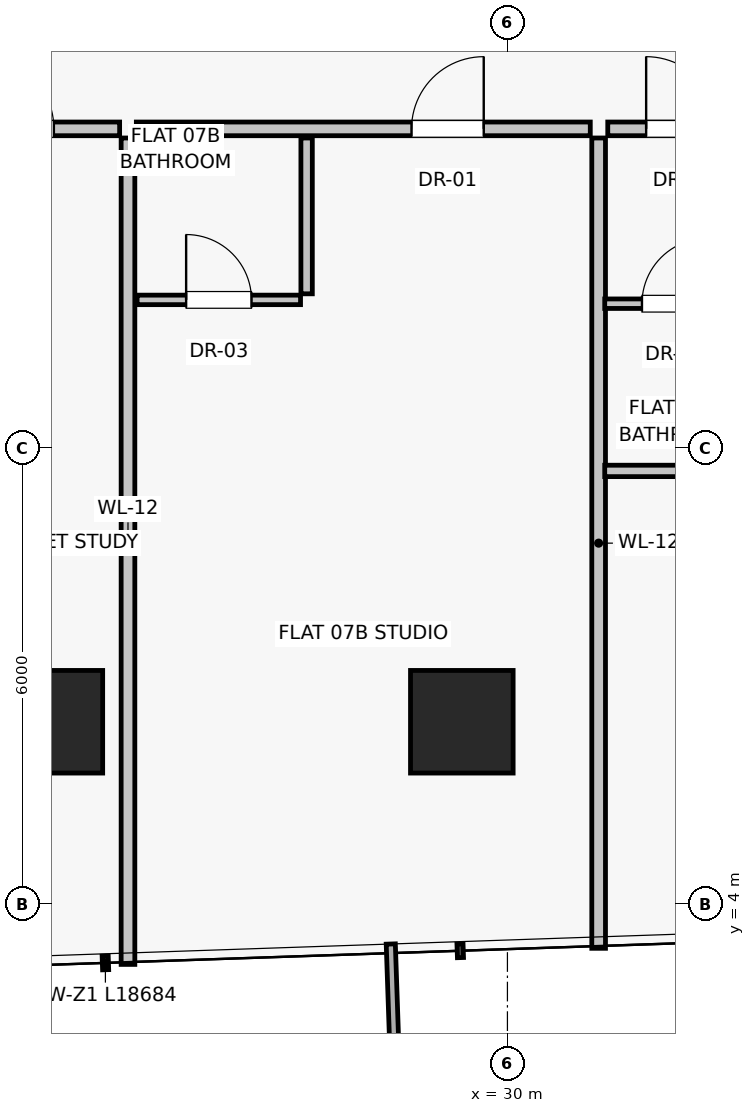
"""IFC4 building model, lengths in metres.
Left out: names, types, materials, properties, quantities, classifications, styles, units other than length and angle.
Written with IfcOpenShell. Run it as: python <this file> out.ifc"""

import sys

from ifc_helpers import new_model, si_unit, direction, frame, frame_2d, origin, origin_2d, place, context, subcontext, project, spatial, rectangle, extrude, source, transform, mapped, element, fill, save


model = new_model("IFC4")
c1 = context("Model", 3, precision=1e-05, world=origin(), true_north=direction((0.0, 1.0)))
c2 = subcontext(c1, "Body", "Model", "MODEL_VIEW")
j1 = project(units=[si_unit("LENGTHUNIT", "METRE"), si_unit("PLANEANGLEUNIT", "RADIAN")], contexts=[c1])
p1 = place(None, origin())
s1 = spatial("IfcSite", under=j1, at=p1, CompositionType="ELEMENT")
p2 = place(p1, origin())
s2 = spatial("IfcBuilding", under=s1, at=p2, CompositionType="ELEMENT")
p3 = place(p2, frame((0.0, 0.0, 30.55)))
s3 = spatial("IfcBuildingStorey", under=s2, at=p3, CompositionType="ELEMENT", Elevation=30.55)
for number, where, z_axis, x_axis in (
    (1, (24.0, 6.4, 0.0), (0.0, 0.0, 1.0), (1.0, 0.0, 0.0)),
    (2, (29.4, 6.4, 0.0), (0.0, 0.0, 1.0), (1.0, 0.0, 0.0)),
):
    element("IfcColumn", number, at=place(p3, frame(where, z_axis=z_axis, x_axis=x_axis)), inside=s3, PredefinedType="COLUMN", context=c2, shape_type="SweptSolid", body=[
        extrude(rectangle(XDim=1.35, YDim=1.35, at=origin_2d()), origin(), (0.0, 0.0, 1.0), 3.25),
    ])
p4 = place(p3, frame((31.2, 14.08, 0.0), z_axis=(0.0, 0.0, 1.0), x_axis=(0.0, -1.0, 0.0)))
e3 = element("IfcWall", 3, at=p4, inside=s3, PredefinedType="PARTITIONING", context=c2, shape_type="SweptSolid", body=[
    extrude(rectangle(XDim=10.66, YDim=0.18, at=frame_2d((5.33, 0.0))), origin(), (0.0, 0.0, 1.0), 3.0),
])
p5 = place(p3, frame((22.168, 14.2, 0.0), z_axis=(0.0, 0.0, 1.0), x_axis=(1.0, 0.0, 0.0)))
e4 = element("IfcWall", 4, at=p5, inside=s3, PredefinedType="PARTITIONING", context=c2, shape_type="SweptSolid", body=[
    extrude(rectangle(XDim=2.73, YDim=0.18, at=frame_2d((1.365, 0.0))), origin(), (0.0, 0.0, 1.0), 3.0),
])
p6 = place(p5, frame((0.865, 0.0, 0.0)))
e5 = element("IfcOpeningElement", 5, at=p6, cuts=e4, PredefinedType="OPENING", context=c2, shape_type="SweptSolid", body=[
    extrude(rectangle(XDim=1.0, YDim=2.01, at=frame_2d((0.5, 1.005))), frame((0.0, 0.1, 0.0), z_axis=(0.0, -1.0, 0.0), x_axis=(1.0, 0.0, 0.0)), (0.0, 0.0, 1.0), 0.2),
])
p7 = place(p3, frame((25.008, 14.08, 0.0), z_axis=(0.0, 0.0, 1.0), x_axis=(0.0, -1.0, 0.0)))
e6 = element("IfcWall", 6, at=p7, inside=s3, PredefinedType="PARTITIONING", context=c2, shape_type="SweptSolid", body=[
    extrude(rectangle(XDim=10.872, YDim=0.18, at=frame_2d((5.436, 0.0))), origin(), (0.0, 0.0, 1.0), 3.0),
])
p8 = place(p3, frame((25.118, 14.2, 0.0), z_axis=(0.0, 0.0, 1.0), x_axis=(1.0, 0.0, 0.0)))
e7 = element("IfcWall", 7, at=p8, inside=s3, PredefinedType="PARTITIONING", context=c2, shape_type="SweptSolid", body=[
    extrude(rectangle(XDim=5.972, YDim=0.18, at=frame_2d((2.986, 0.0))), origin(), (0.0, 0.0, 1.0), 3.0),
])
p9 = place(p8, frame((3.62, 0.0, 0.0)))
e8 = element("IfcOpeningElement", 8, at=p9, cuts=e7, PredefinedType="OPENING", context=c2, shape_type="SweptSolid", body=[
    extrude(rectangle(XDim=0.95, YDim=2.02, at=frame_2d((0.475, 1.01))), frame((0.0, 0.1, 0.0), z_axis=(0.0, -1.0, 0.0), x_axis=(1.0, 0.0, 0.0)), (0.0, 0.0, 1.0), 0.2),
])
p10 = place(p3, frame((27.358, 14.08, 0.0), z_axis=(0.0, 0.0, 1.0), x_axis=(0.0, -1.0, 0.0)))
e9 = element("IfcWall", 9, at=p10, inside=s3, PredefinedType="PARTITIONING", context=c2, shape_type="SweptSolid", body=[
    extrude(rectangle(XDim=2.05, YDim=0.15, at=frame_2d((1.025, 0.0))), origin(), (0.0, 0.0, 1.0), 3.0),
])
p11 = place(p3, frame((25.128, 11.95, 0.0), z_axis=(0.0, 0.0, 1.0), x_axis=(1.0, 0.0, 0.0)))
e10 = element("IfcWall", 10, at=p11, inside=s3, PredefinedType="PARTITIONING", context=c2, shape_type="SweptSolid", body=[
    extrude(rectangle(XDim=2.15, YDim=0.125, at=frame_2d((1.075, 0.0))), origin(), (0.0, 0.0, 1.0), 2.58),
])
p12 = place(p11, frame((0.645, 0.0, 0.0)))
e11 = element("IfcOpeningElement", 11, at=p12, cuts=e10, PredefinedType="OPENING", context=c2, shape_type="SweptSolid", body=[
    extrude(rectangle(XDim=0.86, YDim=2.01, at=frame_2d((0.43, 1.005))), frame((0.0, 0.073, 0.0), z_axis=(0.0, -1.0, 0.0), x_axis=(1.0, 0.0, 0.0)), (0.0, 0.0, 1.0), 0.145),
])
p13 = place(p3, frame((31.32, 14.2, 0.0), z_axis=(0.0, 0.0, 1.0), x_axis=(1.0, 0.0, 0.0)))
e12 = element("IfcWall", 12, at=p13, inside=s3, PredefinedType="PARTITIONING", context=c2, shape_type="SweptSolid", body=[
    extrude(rectangle(XDim=1.96, YDim=0.18, at=frame_2d((0.98, 0.0))), origin(), (0.0, 0.0, 1.0), 3.0),
])
p14 = place(p13, frame((0.505, 0.0, 0.0)))
e13 = element("IfcOpeningElement", 13, at=p14, cuts=e12, PredefinedType="OPENING", context=c2, shape_type="SweptSolid", body=[
    extrude(rectangle(XDim=0.95, YDim=2.02, at=frame_2d((0.475, 1.01))), frame((0.0, 0.1, 0.0), z_axis=(0.0, -1.0, 0.0), x_axis=(1.0, 0.0, 0.0)), (0.0, 0.0, 1.0), 0.2),
])
p15 = place(p3, frame((31.28, 11.9, 0.0), z_axis=(0.0, 0.0, 1.0), x_axis=(1.0, 0.0, 0.0)))
e14 = element("IfcWall", 14, at=p15, inside=s3, PredefinedType="PARTITIONING", context=c2, shape_type="SweptSolid", body=[
    extrude(rectangle(XDim=1.84, YDim=0.125, at=frame_2d((0.92, 0.0))), origin(), (0.0, 0.0, 1.0), 3.0),
])
p16 = place(p15, frame((0.49, 0.0, 0.0)))
e15 = element("IfcOpeningElement", 15, at=p16, cuts=e14, PredefinedType="OPENING", context=c2, shape_type="SweptSolid", body=[
    extrude(rectangle(XDim=0.86, YDim=2.01, at=frame_2d((0.43, 1.005))), frame((0.0, 0.073, 0.0), z_axis=(0.0, -1.0, 0.0), x_axis=(1.0, 0.0, 0.0)), (0.0, 0.0, 1.0), 0.145),
])
p17 = place(p3, frame((31.28, 9.7, 0.0), z_axis=(0.0, 0.0, 1.0), x_axis=(1.0, 0.0, 0.0)))
e16 = element("IfcWall", 16, at=p17, inside=s3, PredefinedType="PARTITIONING", context=c2, shape_type="SweptSolid", body=[
    extrude(rectangle(XDim=1.84, YDim=0.15, at=frame_2d((0.92, 0.0))), origin(), (0.0, 0.0, 1.0), 3.0),
])
m1 = source(origin(), c2, "Body", "SweptSolid", [
    extrude(rectangle(XDim=1.0, YDim=2.01, at=frame_2d((0.5, 1.005))), frame((0.0, 0.025, 0.0), z_axis=(0.0, -1.0, 0.0), x_axis=(1.0, 0.0, 0.0)), (0.0, 0.0, 1.0), 0.05),
])
p18 = place(p6, origin())
e17 = element("IfcDoor", 17, at=p18, inside=s3, OperationType="SINGLE_SWING_LEFT", PredefinedType="DOOR", context=c2, shape_type="MappedRepresentation", body=[
    mapped(m1, transform((0.0, 0.0, 0.0), scale=1.0)),
])
fill(e5, e17)
m2 = source(origin(), c2, "Body", "SweptSolid", [
    extrude(rectangle(XDim=0.95, YDim=2.02, at=frame_2d((0.475, 1.01))), frame((0.0, 0.025, 0.0), z_axis=(0.0, -1.0, 0.0), x_axis=(1.0, 0.0, 0.0)), (0.0, 0.0, 1.0), 0.05),
])
p19 = place(p9, origin())
e18 = element("IfcDoor", 18, at=p19, inside=s3, OperationType="SINGLE_SWING_RIGHT", PredefinedType="DOOR", context=c2, shape_type="MappedRepresentation", body=[
    mapped(m2, transform((0.0, 0.0, 0.0), scale=1.0)),
])
fill(e8, e18)
m3 = source(origin(), c2, "Body", "SweptSolid", [
    extrude(rectangle(XDim=0.86, YDim=2.01, at=frame_2d((0.43, 1.005))), frame((0.0, 0.025, 0.0), z_axis=(0.0, -1.0, 0.0), x_axis=(1.0, 0.0, 0.0)), (0.0, 0.0, 1.0), 0.05),
])
p20 = place(p12, origin())
e19 = element("IfcDoor", 19, at=p20, inside=s3, OperationType="SINGLE_SWING_LEFT", PredefinedType="DOOR", context=c2, shape_type="MappedRepresentation", body=[
    mapped(m3, transform((0.0, 0.0, 0.0), scale=1.0)),
])
fill(e11, e19)
p21 = place(p14, origin())
e20 = element("IfcDoor", 20, at=p21, inside=s3, OperationType="SINGLE_SWING_LEFT", PredefinedType="DOOR", context=c2, shape_type="MappedRepresentation", body=[
    mapped(m2, transform((0.0, 0.0, 0.0), scale=1.0)),
])
fill(e13, e20)
p22 = place(p16, origin())
e21 = element("IfcDoor", 21, at=p22, inside=s3, OperationType="SINGLE_SWING_RIGHT", PredefinedType="DOOR", context=c2, shape_type="MappedRepresentation", body=[
    mapped(m3, transform((0.0, 0.0, 0.0), scale=1.0)),
])
fill(e15, e21)
save(model, sys.argv[1])
